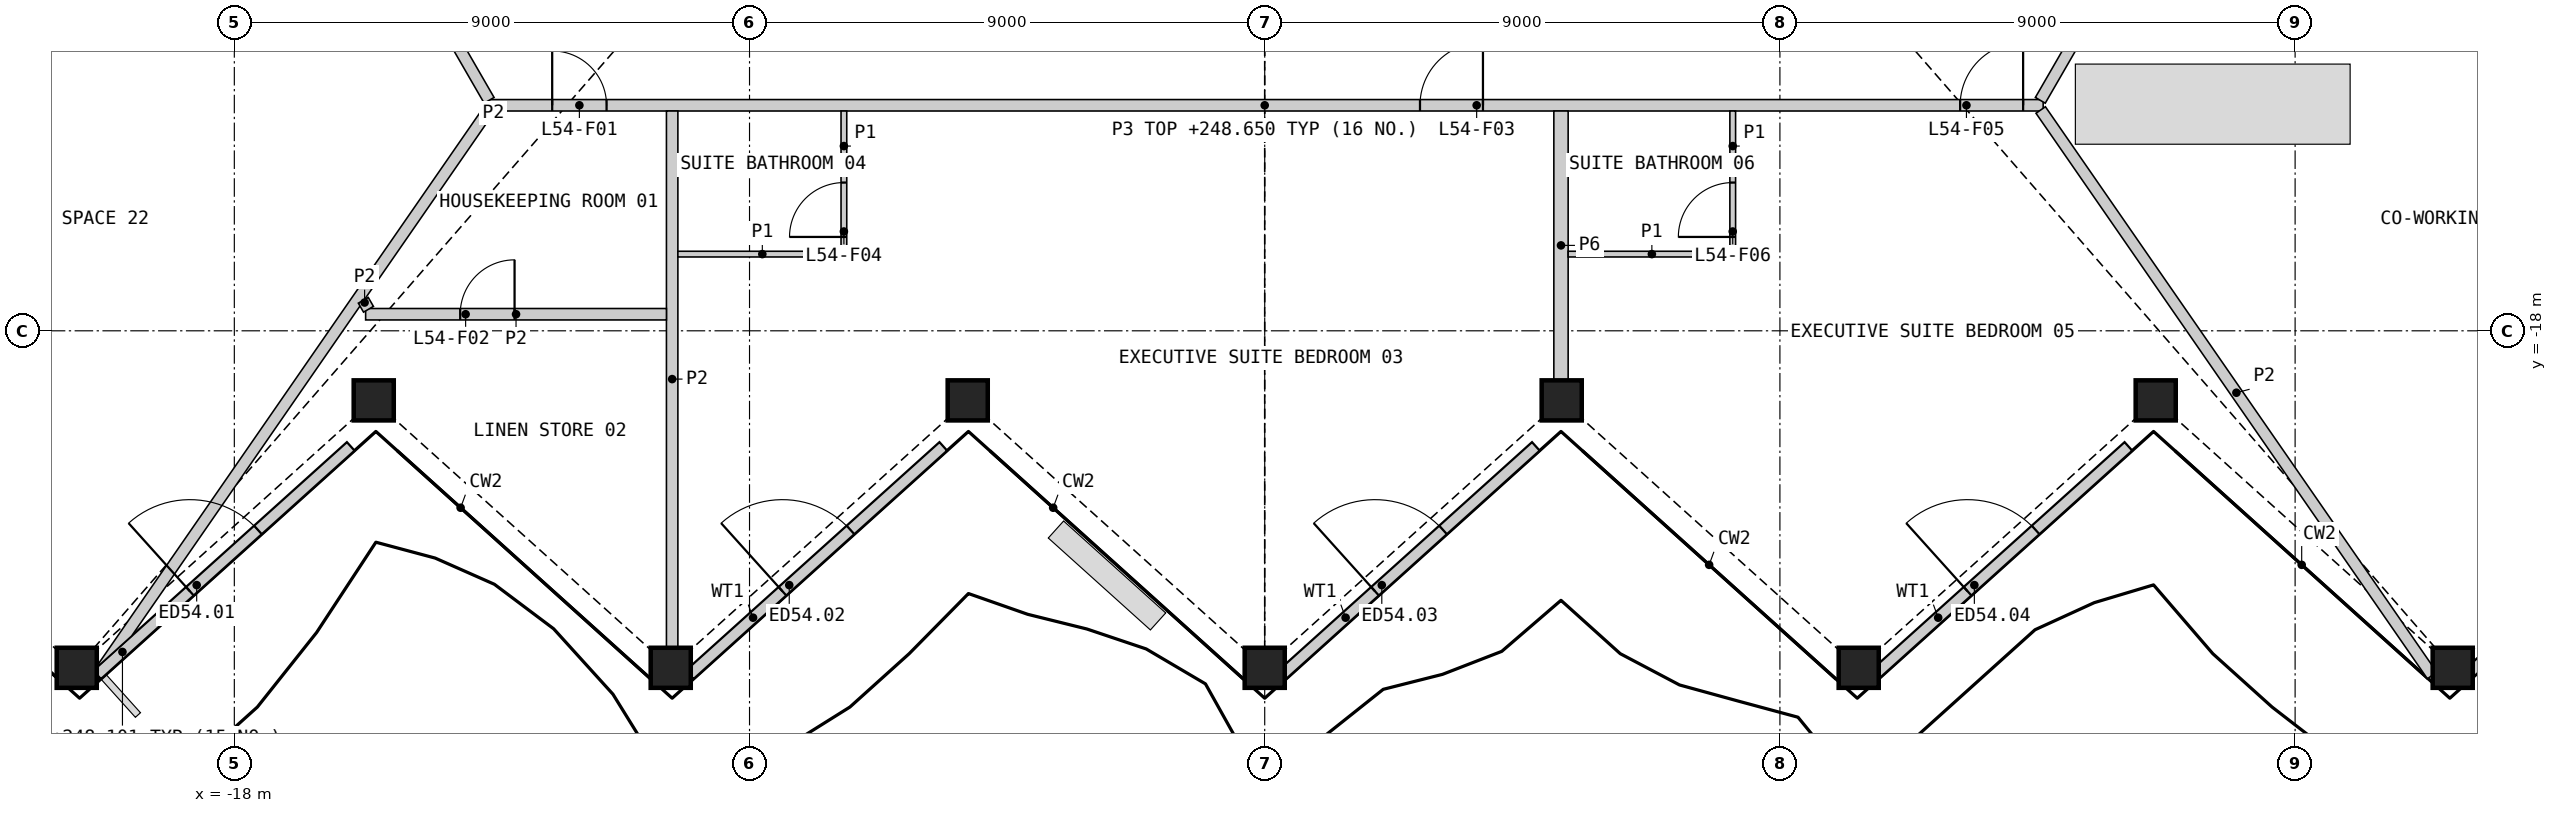
"""IFC4 building model, lengths in metres.
Left out: names, types, materials, properties, quantities, classifications, styles, units other than length and angle.
Written with IfcOpenShell. Run it as: python <this file> out.ifc"""

import sys

from ifc_helpers import new_model, si_unit, direction, frame, frame_2d, origin, origin_2d, place, context, subcontext, project, spatial, polyline, rectangle, hollow_rectangle, outline, extrude, element, fill, save


model = new_model("IFC4")
c1 = context("Model", 3, precision=1e-05, world=origin(), true_north=direction((0.0, 1.0)))
c2 = subcontext(c1, "Body", "Model", "MODEL_VIEW")
j1 = project(units=[si_unit("LENGTHUNIT", "METRE"), si_unit("PLANEANGLEUNIT", "RADIAN")], contexts=[c1])
p1 = place(None, origin())
s1 = spatial("IfcSite", under=j1, at=p1, CompositionType="ELEMENT")
p2 = place(p1, origin())
s2 = spatial("IfcBuilding", under=s1, at=p2, CompositionType="ELEMENT")
p3 = place(p2, frame((0.0, 0.0, 245.4)))
s3 = spatial("IfcBuildingStorey", under=s2, at=p3, CompositionType="ELEMENT", Elevation=245.4)
for number, where, z_axis, x_axis in (
    (1, (-20.753, -23.887, 0.0), (0.0, 0.0, 1.0), (1.0, 0.0, 0.0)),
    (2, (-15.565, -19.215, 0.0), (0.0, 0.0, 1.0), (1.0, 0.0, 0.0)),
    (3, (-10.376, -23.887, 0.0), (0.0, 0.0, 1.0), (1.0, 0.0, 0.0)),
    (4, (-5.188, -19.215, 0.0), (0.0, 0.0, 1.0), (1.0, 0.0, 0.0)),
    (5, (0.0, -23.887, 0.0), (0.0, 0.0, 1.0), (1.0, 0.0, 0.0)),
    (6, (5.188, -19.215, 0.0), (0.0, 0.0, 1.0), (1.0, 0.0, 0.0)),
    (7, (10.376, -23.887, 0.0), (0.0, 0.0, 1.0), (1.0, 0.0, 0.0)),
    (8, (15.565, -19.215, 0.0), (0.0, 0.0, 1.0), (1.0, 0.0, 0.0)),
    (9, (20.753, -23.887, 0.0), (0.0, 0.0, 1.0), (1.0, 0.0, 0.0)),
):
    element("IfcColumn", number, at=place(p3, frame(where, z_axis=z_axis, x_axis=x_axis)), inside=s3, PredefinedType="COLUMN", context=c2, shape_type="SweptSolid", body=[
        extrude(hollow_rectangle(XDim=0.7, YDim=0.7, WallThickness=0.045, at=origin_2d()), origin(), (0.0, 0.0, 1.0), 3.6),
    ])
p4 = place(p3, frame((-20.397, -24.009, 0.0), z_axis=(0.0, 0.0, 1.0), x_axis=(0.74315161366, 0.669123067241, 0.0)))
e10 = element("IfcWall", 10, at=p4, inside=s3, PredefinedType="SOLIDWALL", context=c2, shape_type="SweptSolid", body=[
    extrude(rectangle(XDim=5.963, YDim=0.2, at=frame_2d((2.981, 0.0))), origin(), (0.0, 0.0, 1.0), 2.701),
])
p5 = place(p4, frame((2.181, 0.0, 0.0)))
e11 = element("IfcOpeningElement", 11, at=p5, cuts=e10, PredefinedType="OPENING", context=c2, shape_type="SweptSolid", body=[
    extrude(rectangle(XDim=1.6, YDim=2.4, at=frame_2d((0.8, 1.2))), frame((0.0, 0.11, 0.0), z_axis=(0.0, -1.0, 0.0), x_axis=(1.0, 0.0, 0.0)), (0.0, 0.0, 1.0), 0.22),
])
p6 = place(p3, frame((-10.046, -24.009, 0.0), z_axis=(0.0, 0.0, 1.0), x_axis=(0.743133280699, 0.669143427912, 0.0)))
e12 = element("IfcWall", 12, at=p6, inside=s3, PredefinedType="SOLIDWALL", context=c2, shape_type="SweptSolid", body=[
    extrude(rectangle(XDim=5.962, YDim=0.2, at=frame_2d((2.981, 0.0))), origin(), (0.0, 0.0, 1.0), 2.701),
])
p7 = place(p6, frame((2.181, 0.0, 0.0)))
e13 = element("IfcOpeningElement", 13, at=p7, cuts=e12, PredefinedType="OPENING", context=c2, shape_type="SweptSolid", body=[
    extrude(rectangle(XDim=1.6, YDim=2.4, at=frame_2d((0.8, 1.2))), frame((0.0, 0.11, 0.0), z_axis=(0.0, -1.0, 0.0), x_axis=(1.0, 0.0, 0.0)), (0.0, 0.0, 1.0), 0.22),
])
p8 = place(p3, frame((0.305, -24.009, 0.0), z_axis=(0.0, 0.0, 1.0), x_axis=(0.74315161366, 0.669123067241, 0.0)))
e14 = element("IfcWall", 14, at=p8, inside=s3, PredefinedType="SOLIDWALL", context=c2, shape_type="SweptSolid", body=[
    extrude(rectangle(XDim=5.963, YDim=0.2, at=frame_2d((2.981, 0.0))), origin(), (0.0, 0.0, 1.0), 2.701),
])
p9 = place(p8, frame((2.181, 0.0, 0.0)))
e15 = element("IfcOpeningElement", 15, at=p9, cuts=e14, PredefinedType="OPENING", context=c2, shape_type="SweptSolid", body=[
    extrude(rectangle(XDim=1.6, YDim=2.4, at=frame_2d((0.8, 1.2))), frame((0.0, 0.11, 0.0), z_axis=(0.0, -1.0, 0.0), x_axis=(1.0, 0.0, 0.0)), (0.0, 0.0, 1.0), 0.22),
])
p10 = place(p3, frame((10.657, -24.009, 0.0), z_axis=(0.0, 0.0, 1.0), x_axis=(0.74315161366, 0.669123067241, 0.0)))
e16 = element("IfcWall", 16, at=p10, inside=s3, PredefinedType="SOLIDWALL", context=c2, shape_type="SweptSolid", body=[
    extrude(rectangle(XDim=5.963, YDim=0.2, at=frame_2d((2.981, 0.0))), origin(), (0.0, 0.0, 1.0), 2.701),
])
p11 = place(p10, frame((2.181, 0.0, 0.0)))
e17 = element("IfcOpeningElement", 17, at=p11, cuts=e16, PredefinedType="OPENING", context=c2, shape_type="SweptSolid", body=[
    extrude(rectangle(XDim=1.6, YDim=2.4, at=frame_2d((0.8, 1.2))), frame((0.0, 0.11, 0.0), z_axis=(0.0, -1.0, 0.0), x_axis=(1.0, 0.0, 0.0)), (0.0, 0.0, 1.0), 0.22),
])
p12 = place(p3, frame((21.008, -24.009, 0.0), z_axis=(0.0, 0.0, 1.0), x_axis=(0.743133280699, 0.669143427912, 0.0)))
e18 = element("IfcWall", 18, at=p12, inside=s3, PredefinedType="SOLIDWALL", context=c2, shape_type="SweptSolid", body=[
    extrude(rectangle(XDim=5.962, YDim=0.2, at=frame_2d((2.981, 0.0))), origin(), (0.0, 0.0, 1.0), 2.701),
])
p13 = place(p12, frame((2.181, 0.0, 0.0)))
e19 = element("IfcOpeningElement", 19, at=p13, cuts=e18, PredefinedType="OPENING", context=c2, shape_type="SweptSolid", body=[
    extrude(rectangle(XDim=1.6, YDim=2.4, at=frame_2d((0.8, 1.2))), frame((0.0, 0.11, 0.0), z_axis=(0.0, -1.0, 0.0), x_axis=(1.0, 0.0, 0.0)), (0.0, 0.0, 1.0), 0.22),
])
p14 = place(p3, frame((-13.599, -14.06, 0.0), z_axis=(0.0, 0.0, 1.0), x_axis=(1.0, 0.0, 0.0)))
e20 = element("IfcWall", 20, at=p14, inside=s3, PredefinedType="PARTITIONING", context=c2, shape_type="SweptSolid", body=[
    extrude(rectangle(XDim=27.198, YDim=0.2, at=frame_2d((13.599, 0.0))), origin(), (0.0, 0.0, 1.0), 3.25),
])
p15 = place(p14, frame((1.152, 0.0, 0.0)))
e21 = element("IfcOpeningElement", 21, at=p15, cuts=e20, PredefinedType="OPENING", context=c2, shape_type="SweptSolid", body=[
    extrude(rectangle(XDim=0.95, YDim=2.1, at=frame_2d((0.475, 1.05))), frame((0.0, 0.11, 0.0), z_axis=(0.0, -1.0, 0.0), x_axis=(1.0, 0.0, 0.0)), (0.0, 0.0, 1.0), 0.22),
])
p16 = place(p14, frame((16.311, 0.0, 0.0)))
e22 = element("IfcOpeningElement", 22, at=p16, cuts=e20, PredefinedType="OPENING", context=c2, shape_type="SweptSolid", body=[
    extrude(rectangle(XDim=1.1, YDim=2.1, at=frame_2d((0.55, 1.05))), frame((0.0, 0.11, 0.0), z_axis=(0.0, -1.0, 0.0), x_axis=(1.0, 0.0, 0.0)), (0.0, 0.0, 1.0), 0.22),
])
p17 = place(p14, frame((25.747, 0.0, 0.0)))
e23 = element("IfcOpeningElement", 23, at=p17, cuts=e20, PredefinedType="OPENING", context=c2, shape_type="SweptSolid", body=[
    extrude(rectangle(XDim=1.1, YDim=2.1, at=frame_2d((0.55, 1.05))), frame((0.0, 0.11, 0.0), z_axis=(0.0, -1.0, 0.0), x_axis=(1.0, 0.0, 0.0)), (0.0, 0.0, 1.0), 0.22),
])
p18 = place(p3, frame((5.176, -18.855, 0.0), z_axis=(0.0, 0.0, 1.0), x_axis=(0.0, 1.0, 0.0)))
e24 = element("IfcWall", 24, at=p18, inside=s3, PredefinedType="PARTITIONING", context=c2, shape_type="SweptSolid", body=[
    extrude(rectangle(XDim=4.695, YDim=0.25, at=frame_2d((2.348, 0.0))), origin(), (0.0, 0.0, 1.0), 2.404),
])
for number, where, z_axis, x_axis in (
    (25, (13.549, -13.974, 0.0), (0.0, 0.0, 1.0), (0.5, 0.866, 0.0)),
    (26, (-15.05, -11.374, 0.0), (0.0, 0.0, 1.0), (0.5, -0.866, 0.0)),
):
    element("IfcWall", number, at=place(p3, frame(where, z_axis=z_axis, x_axis=x_axis)), inside=s3, PredefinedType="PARTITIONING", context=c2, shape_type="SweptSolid", body=[
        extrude(rectangle(XDim=3.002, YDim=0.2, at=frame_2d((1.501, 0.0))), origin(), (0.0, 0.0, 1.0), 3.25),
    ])
p19 = place(p3, origin())
e27 = element("IfcWall", 27, at=p19, inside=s3, PredefinedType="PARTITIONING", context=c2, shape_type="SweptSolid", body=[
    extrude(outline(polyline([(-13.473, -14.199), (-19.794, -23.331), (-20.439, -23.912), (-13.638, -14.086), (-13.473, -14.199)])), origin(), (0.0, 0.0, 1.0), 2.404),
])
p20 = place(p3, frame((13.556, -14.143, 0.0), z_axis=(0.0, 0.0, 1.0), x_axis=(0.56913494803, -0.82224413098, 0.0)))
e28 = element("IfcWall", 28, at=p20, inside=s3, PredefinedType="PARTITIONING", context=c2, shape_type="SweptSolid", body=[
    extrude(rectangle(XDim=12.014, YDim=0.2, at=frame_2d((6.007, 0.0))), origin(), (0.0, 0.0, 1.0), 2.404),
])
p21 = place(p3, frame((-10.351, -23.527, 0.0), z_axis=(0.0, 0.0, 1.0), x_axis=(0.0, 1.0, 0.0)))
e29 = element("IfcWall", 29, at=p21, inside=s3, PredefinedType="PARTITIONING", context=c2, shape_type="SweptSolid", body=[
    extrude(rectangle(XDim=9.366, YDim=0.2, at=frame_2d((4.683, 0.0))), origin(), (0.0, 0.0, 1.0), 2.404),
])
p22 = place(p3, frame((-15.706, -17.71, 0.0), z_axis=(0.0, 0.0, 1.0), x_axis=(1.0, 0.0, 0.0)))
e30 = element("IfcWall", 30, at=p22, inside=s3, PredefinedType="PARTITIONING", context=c2, shape_type="SweptSolid", body=[
    extrude(rectangle(XDim=5.255, YDim=0.2, at=frame_2d((2.627, 0.0))), origin(), (0.0, 0.0, 1.0), 2.404),
])
p23 = place(p22, frame((1.652, 0.0, 0.0)))
e31 = element("IfcOpeningElement", 31, at=p23, cuts=e30, PredefinedType="OPENING", context=c2, shape_type="SweptSolid", body=[
    extrude(rectangle(XDim=0.95, YDim=2.1, at=frame_2d((0.475, 1.05))), frame((0.0, 0.11, 0.0), z_axis=(0.0, -1.0, 0.0), x_axis=(1.0, 0.0, 0.0)), (0.0, 0.0, 1.0), 0.22),
])
p24 = place(p3, frame((-15.747, -17.467, 0.0), z_axis=(0.0, 0.0, 1.0), x_axis=(0.498749683645, -0.866746071848, 0.0)))
e32 = element("IfcWall", 32, at=p24, inside=s3, PredefinedType="PARTITIONING", context=c2, shape_type="SweptSolid", body=[
    extrude(rectangle(XDim=0.181, YDim=0.2, at=frame_2d((0.091, 0.0))), origin(), (0.0, 0.0, 1.0), 2.404),
])
p25 = place(p3, frame((-10.251, -16.66, 0.0), z_axis=(0.0, 0.0, 1.0), x_axis=(1.0, 0.0, 0.0)))
e33 = element("IfcWall", 33, at=p25, inside=s3, PredefinedType="PARTITIONING", context=c2, shape_type="SweptSolid", body=[
    extrude(rectangle(XDim=2.95, YDim=0.1, at=frame_2d((1.475, 0.0))), origin(), (0.0, 0.0, 1.0), 2.404),
])
p26 = place(p3, frame((5.301, -16.66, 0.0), z_axis=(0.0, 0.0, 1.0), x_axis=(1.0, 0.0, 0.0)))
e34 = element("IfcWall", 34, at=p26, inside=s3, PredefinedType="PARTITIONING", context=c2, shape_type="SweptSolid", body=[
    extrude(rectangle(XDim=2.925, YDim=0.1, at=frame_2d((1.462, 0.0))), origin(), (0.0, 0.0, 1.0), 2.404),
])
p27 = place(p3, frame((-7.351, -16.61, 0.0), z_axis=(0.0, 0.0, 1.0), x_axis=(0.0, 1.0, 0.0)))
e35 = element("IfcWall", 35, at=p27, inside=s3, PredefinedType="PARTITIONING", context=c2, shape_type="SweptSolid", body=[
    extrude(rectangle(XDim=2.45, YDim=0.1, at=frame_2d((1.225, 0.0))), origin(), (0.0, 0.0, 1.0), 2.404),
])
p28 = place(p27, frame((0.25, 0.0, 0.0)))
e36 = element("IfcOpeningElement", 36, at=p28, cuts=e35, PredefinedType="OPENING", context=c2, shape_type="SweptSolid", body=[
    extrude(rectangle(XDim=0.95, YDim=2.1, at=frame_2d((0.475, 1.05))), frame((0.0, 0.06, 0.0), z_axis=(0.0, -1.0, 0.0), x_axis=(1.0, 0.0, 0.0)), (0.0, 0.0, 1.0), 0.12),
])
p29 = place(p3, frame((8.176, -16.61, 0.0), z_axis=(0.0, 0.0, 1.0), x_axis=(0.0, 1.0, 0.0)))
e37 = element("IfcWall", 37, at=p29, inside=s3, PredefinedType="PARTITIONING", context=c2, shape_type="SweptSolid", body=[
    extrude(rectangle(XDim=2.45, YDim=0.1, at=frame_2d((1.225, 0.0))), origin(), (0.0, 0.0, 1.0), 2.404),
])
p30 = place(p29, frame((0.25, 0.0, 0.0)))
e38 = element("IfcOpeningElement", 38, at=p30, cuts=e37, PredefinedType="OPENING", context=c2, shape_type="SweptSolid", body=[
    extrude(rectangle(XDim=0.95, YDim=2.1, at=frame_2d((0.475, 1.05))), frame((0.0, 0.06, 0.0), z_axis=(0.0, -1.0, 0.0), x_axis=(1.0, 0.0, 0.0)), (0.0, 0.0, 1.0), 0.12),
])
p31 = place(p5, origin())
e39 = element("IfcDoor", 39, at=p31, inside=s3, OperationType="DOUBLE_DOOR_SINGLE_SWING", PredefinedType="DOOR", context=c2, shape_type="SweptSolid", body=[
    extrude(rectangle(XDim=1.6, YDim=2.4, at=frame_2d((0.8, 1.2))), frame((0.0, 0.025, 0.0), z_axis=(0.0, -1.0, 0.0), x_axis=(1.0, 0.0, 0.0)), (0.0, 0.0, 1.0), 0.05),
])
fill(e11, e39)
p32 = place(p7, origin())
e40 = element("IfcDoor", 40, at=p32, inside=s3, OperationType="DOUBLE_DOOR_SINGLE_SWING", PredefinedType="DOOR", context=c2, shape_type="SweptSolid", body=[
    extrude(rectangle(XDim=1.6, YDim=2.4, at=frame_2d((0.8, 1.2))), frame((0.0, 0.025, 0.0), z_axis=(0.0, -1.0, 0.0), x_axis=(1.0, 0.0, 0.0)), (0.0, 0.0, 1.0), 0.05),
])
fill(e13, e40)
p33 = place(p9, origin())
e41 = element("IfcDoor", 41, at=p33, inside=s3, OperationType="DOUBLE_DOOR_SINGLE_SWING", PredefinedType="DOOR", context=c2, shape_type="SweptSolid", body=[
    extrude(rectangle(XDim=1.6, YDim=2.4, at=frame_2d((0.8, 1.2))), frame((0.0, 0.025, 0.0), z_axis=(0.0, -1.0, 0.0), x_axis=(1.0, 0.0, 0.0)), (0.0, 0.0, 1.0), 0.05),
])
fill(e15, e41)
p34 = place(p11, origin())
e42 = element("IfcDoor", 42, at=p34, inside=s3, OperationType="DOUBLE_DOOR_SINGLE_SWING", PredefinedType="DOOR", context=c2, shape_type="SweptSolid", body=[
    extrude(rectangle(XDim=1.6, YDim=2.4, at=frame_2d((0.8, 1.2))), frame((0.0, 0.025, 0.0), z_axis=(0.0, -1.0, 0.0), x_axis=(1.0, 0.0, 0.0)), (0.0, 0.0, 1.0), 0.05),
])
fill(e17, e42)
p35 = place(p15, origin())
e43 = element("IfcDoor", 43, at=p35, inside=s3, OperationType="SINGLE_SWING_LEFT", PredefinedType="DOOR", context=c2, shape_type="SweptSolid", body=[
    extrude(rectangle(XDim=0.95, YDim=2.1, at=frame_2d((0.475, 1.05))), frame((0.0, 0.025, 0.0), z_axis=(0.0, -1.0, 0.0), x_axis=(1.0, 0.0, 0.0)), (0.0, 0.0, 1.0), 0.05),
])
fill(e21, e43)
p36 = place(p23, origin())
e44 = element("IfcDoor", 44, at=p36, inside=s3, OperationType="SINGLE_SWING_RIGHT", PredefinedType="DOOR", context=c2, shape_type="SweptSolid", body=[
    extrude(rectangle(XDim=0.95, YDim=2.1, at=frame_2d((0.475, 1.05))), frame((0.0, 0.025, 0.0), z_axis=(0.0, -1.0, 0.0), x_axis=(1.0, 0.0, 0.0)), (0.0, 0.0, 1.0), 0.05),
])
fill(e31, e44)
p37 = place(p16, origin())
e45 = element("IfcDoor", 45, at=p37, inside=s3, OperationType="SINGLE_SWING_RIGHT", PredefinedType="DOOR", context=c2, shape_type="SweptSolid", body=[
    extrude(rectangle(XDim=1.1, YDim=2.1, at=frame_2d((0.55, 1.05))), frame((0.0, 0.025, 0.0), z_axis=(0.0, -1.0, 0.0), x_axis=(1.0, 0.0, 0.0)), (0.0, 0.0, 1.0), 0.05),
])
fill(e22, e45)
p38 = place(p28, origin())
e46 = element("IfcDoor", 46, at=p38, inside=s3, OperationType="SINGLE_SWING_LEFT", PredefinedType="DOOR", context=c2, shape_type="SweptSolid", body=[
    extrude(rectangle(XDim=0.95, YDim=2.1, at=frame_2d((0.475, 1.05))), frame((0.0, 0.025, 0.0), z_axis=(0.0, -1.0, 0.0), x_axis=(1.0, 0.0, 0.0)), (0.0, 0.0, 1.0), 0.05),
])
fill(e36, e46)
p39 = place(p17, origin())
e47 = element("IfcDoor", 47, at=p39, inside=s3, OperationType="SINGLE_SWING_RIGHT", PredefinedType="DOOR", context=c2, shape_type="SweptSolid", body=[
    extrude(rectangle(XDim=1.1, YDim=2.1, at=frame_2d((0.55, 1.05))), frame((0.0, 0.025, 0.0), z_axis=(0.0, -1.0, 0.0), x_axis=(1.0, 0.0, 0.0)), (0.0, 0.0, 1.0), 0.05),
])
fill(e23, e47)
p40 = place(p30, origin())
e48 = element("IfcDoor", 48, at=p40, inside=s3, OperationType="SINGLE_SWING_LEFT", PredefinedType="DOOR", context=c2, shape_type="SweptSolid", body=[
    extrude(rectangle(XDim=0.95, YDim=2.1, at=frame_2d((0.475, 1.05))), frame((0.0, 0.025, 0.0), z_axis=(0.0, -1.0, 0.0), x_axis=(1.0, 0.0, 0.0)), (0.0, 0.0, 1.0), 0.05),
])
fill(e38, e48)
save(model, sys.argv[1])
